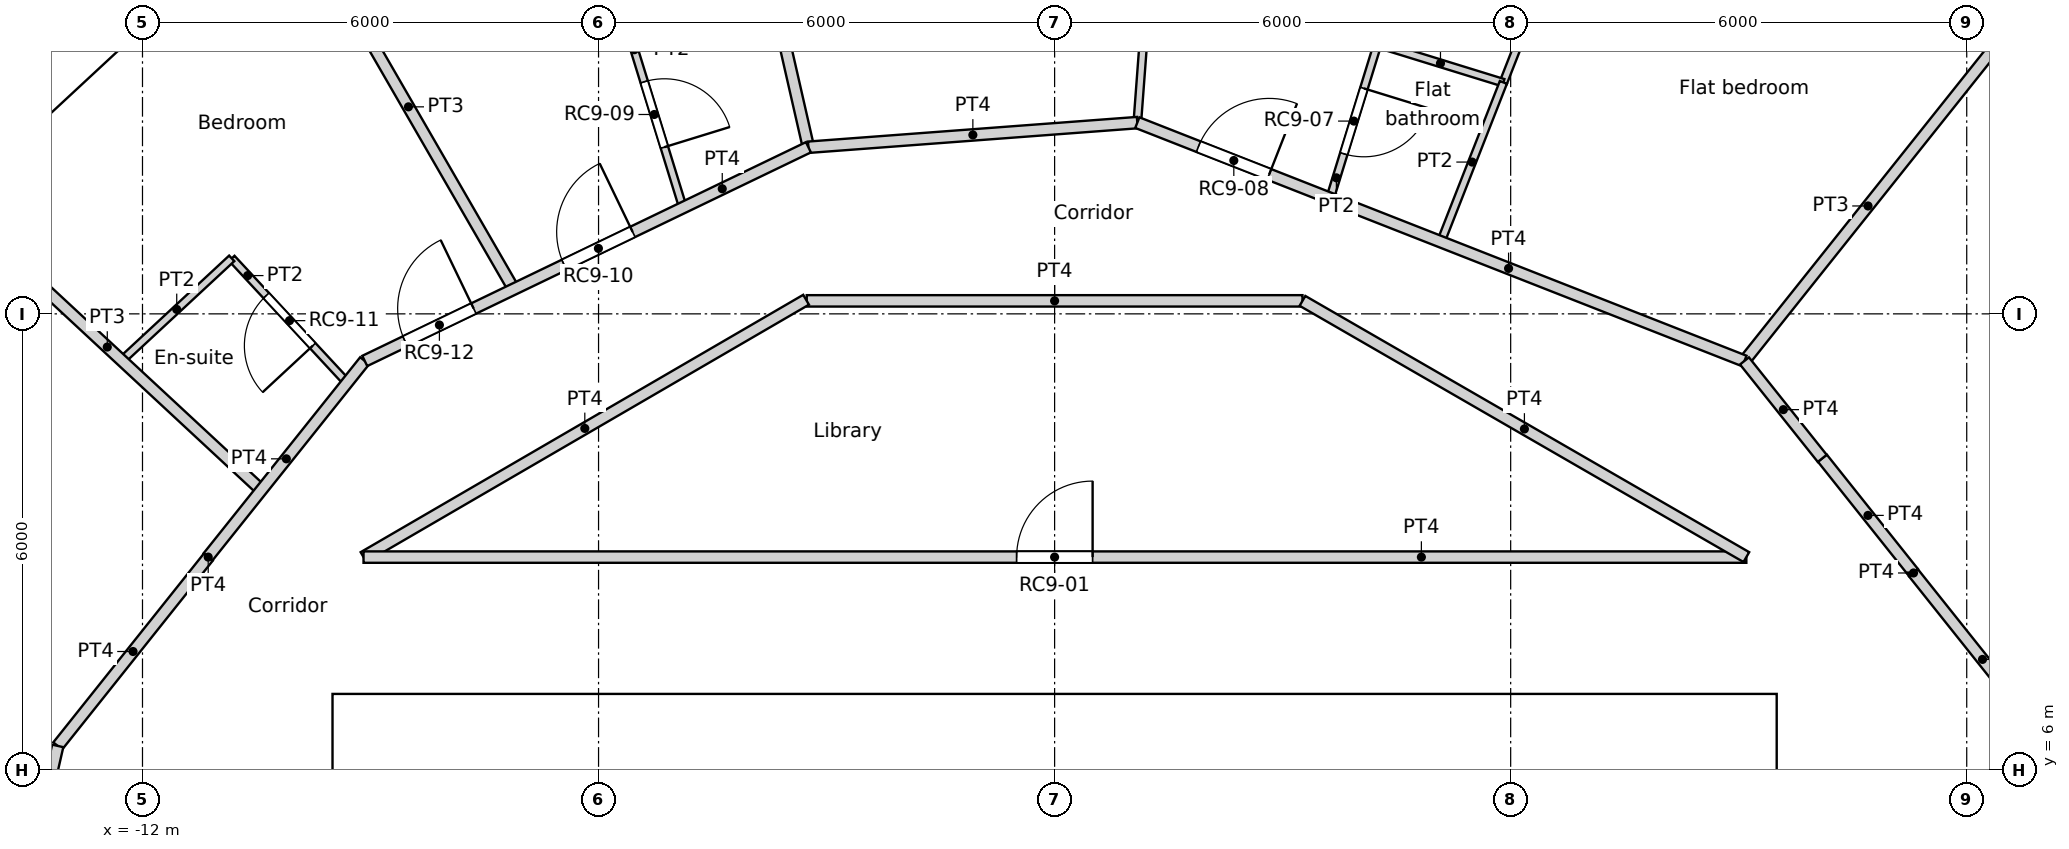
"""IFC4 building model, lengths in metres.
Left out: names, types, materials, properties, quantities, classifications, styles, units other than length and angle.
Written with IfcOpenShell. Run it as: python <this file> out.ifc"""

import sys

from ifc_helpers import new_model, si_unit, direction, frame, frame_2d, origin, origin_2d, place, context, subcontext, project, spatial, rectangle, circle, extrude, element, fill, save


model = new_model("IFC4")
c1 = context("Model", 3, precision=1e-05, world=origin(), true_north=direction((0.0, 1.0)))
c2 = subcontext(c1, "Body", "Model", "MODEL_VIEW")
j1 = project(units=[si_unit("LENGTHUNIT", "METRE"), si_unit("PLANEANGLEUNIT", "RADIAN")], contexts=[c1])
p1 = place(None, origin())
s1 = spatial("IfcSite", under=j1, at=p1, CompositionType="ELEMENT")
p2 = place(p1, origin())
s2 = spatial("IfcBuilding", under=s1, at=p2, CompositionType="ELEMENT")
p3 = place(p2, frame((0.0, 0.0, 316.2)))
s3 = spatial("IfcBuildingStorey", under=s2, at=p3, CompositionType="ELEMENT", Elevation=316.2)
p4 = place(p3, frame((11.735, 14.716, 0.0), z_axis=(0.0, 0.0, 1.0), x_axis=(1.0, 0.0, 0.0)))
e1 = element("IfcColumn", 1, at=p4, inside=s3, PredefinedType="COLUMN", context=c2, shape_type="SweptSolid", body=[
    extrude(circle(Radius=0.45, at=origin_2d()), origin(), (0.0, 0.0, 1.0), 3.6),
])
p5 = place(p3, frame((-12.804, 16.005, -0.35), z_axis=(0.0, 0.0, 1.0), x_axis=(-0.733022439167, -0.680204457261, 0.0)))
e2 = element("IfcWall", 2, at=p5, inside=s3, PredefinedType="ELEMENTEDWALL", context=c2, shape_type="SweptSolid", body=[
    extrude(rectangle(XDim=3.0, YDim=1.45, at=frame_2d((1.5, 0.0))), origin(), (0.0, 0.0, 1.0), 3.6),
])
p6 = place(p5, frame((1.5, 0.0, 1.9)))
e3 = element("IfcOpeningElement", 3, at=p6, cuts=e2, PredefinedType="OPENING", context=c2, shape_type="SweptSolid", body=[
    extrude(circle(Radius=0.9, at=origin_2d()), frame((0.0, 0.735, 0.0), z_axis=(0.0, -1.0, 0.0), x_axis=(1.0, 0.0, 0.0)), (0.0, 0.0, 1.0), 1.47),
])
p7 = place(p3, frame((-9.5, 6.7, 0.0), z_axis=(0.0, 0.0, 1.0), x_axis=(1.0, 0.0, 0.0)))
e4 = element("IfcWall", 4, at=p7, inside=s3, PredefinedType="SOLIDWALL", context=c2, shape_type="SweptSolid", body=[
    extrude(rectangle(XDim=19.0, YDim=0.6, at=frame_2d((9.5, 0.0))), origin(), (0.0, 0.0, 1.0), 3.6),
])
p8 = place(p7, frame((5.35, 0.0, 0.0)))
e5 = element("IfcOpeningElement", 5, at=p8, cuts=e4, PredefinedType="OPENING", context=c2, shape_type="SweptSolid", body=[
    extrude(rectangle(XDim=1.7, YDim=2.1, at=frame_2d((0.85, 1.05))), frame((0.0, 0.3, 0.0), z_axis=(0.0, -1.0, 0.0), x_axis=(1.0, 0.0, 0.0)), (0.0, 0.0, 1.0), 0.6),
])
p9 = place(p3, frame((-9.2, -6.4, 0.0), z_axis=(0.0, 0.0, 1.0), x_axis=(0.0, 1.0, 0.0)))
e6 = element("IfcWall", 6, at=p9, inside=s3, PredefinedType="SOLIDWALL", context=c2, shape_type="SweptSolid", body=[
    extrude(rectangle(XDim=12.8, YDim=0.6, at=frame_2d((6.4, 0.0))), origin(), (0.0, 0.0, 1.0), 3.6),
])
p10 = place(p3, frame((9.2, -6.4, 0.0), z_axis=(0.0, 0.0, 1.0), x_axis=(0.0, 1.0, 0.0)))
e7 = element("IfcWall", 7, at=p10, inside=s3, PredefinedType="SOLIDWALL", context=c2, shape_type="SweptSolid", body=[
    extrude(rectangle(XDim=12.8, YDim=0.6, at=frame_2d((6.4, 0.0))), origin(), (0.0, 0.0, 1.0), 3.6),
])
p11 = place(p10, frame((6.4, 0.0, 0.0)))
e8 = element("IfcOpeningElement", 8, at=p11, cuts=e7, PredefinedType="OPENING", context=c2, shape_type="SweptSolid", body=[
    extrude(rectangle(XDim=1.8, YDim=2.1, at=frame_2d((0.9, 1.05))), frame((0.0, 0.3, 0.0), z_axis=(0.0, -1.0, 0.0), x_axis=(1.0, 0.0, 0.0)), (0.0, 0.0, 1.0), 0.6),
])
for number, where, z_axis, x_axis in (
    (9, (-2.25, 3.25, 0.0), (0.0, 0.0, 1.0), (0.0, 1.0, 0.0)),
    (10, (0.55, 3.25, 0.0), (0.0, 0.0, 1.0), (0.0, 1.0, 0.0)),
    (11, (3.35, 3.25, 0.0), (0.0, 0.0, 1.0), (0.0, 1.0, 0.0)),
    (12, (6.15, 3.25, 0.0), (0.0, 0.0, 1.0), (0.0, 1.0, 0.0)),
):
    element("IfcWall", number, at=place(p3, frame(where, z_axis=z_axis, x_axis=x_axis)), inside=s3, PredefinedType="SOLIDWALL", context=c2, shape_type="SweptSolid", body=[
        extrude(rectangle(XDim=3.15, YDim=0.3, at=frame_2d((1.575, 0.0))), origin(), (0.0, 0.0, 1.0), 3.25),
    ])
p12 = place(p3, frame((-9.092, 8.8, 0.0), z_axis=(0.0, 0.0, 1.0), x_axis=(0.864470922103, 0.502682827277, 0.0)))
e13 = element("IfcWall", 13, at=p12, inside=s3, PredefinedType="PARTITIONING", context=c2, shape_type="SweptSolid", body=[
    extrude(rectangle(XDim=6.735, YDim=0.15, at=frame_2d((3.368, 0.0))), origin(), (0.0, 0.0, 1.0), 3.25),
])
p13 = place(p3, frame((-9.092, 8.8, 0.0), z_axis=(0.0, 0.0, 1.0), x_axis=(1.0, 0.0, 0.0)))
e14 = element("IfcWall", 14, at=p13, inside=s3, PredefinedType="PARTITIONING", context=c2, shape_type="SweptSolid", body=[
    extrude(rectangle(XDim=18.193, YDim=0.15, at=frame_2d((9.096, 0.0))), origin(), (0.0, 0.0, 1.0), 3.25),
])
p14 = place(p13, frame((8.592, 0.0, 0.0)))
e15 = element("IfcOpeningElement", 15, at=p14, cuts=e14, PredefinedType="OPENING", context=c2, shape_type="SweptSolid", body=[
    extrude(rectangle(XDim=1.0, YDim=2.04, at=frame_2d((0.5, 1.02))), frame((0.0, 0.075, 0.0), z_axis=(0.0, -1.0, 0.0), x_axis=(1.0, 0.0, 0.0)), (0.0, 0.0, 1.0), 0.15),
])
p15 = place(p3, frame((10.101, 10.101, 0.0), z_axis=(0.0, 0.0, 1.0), x_axis=(0.623130947784, -0.782117524362, 0.0)))
e16 = element("IfcWall", 16, at=p15, inside=s3, PredefinedType="PARTITIONING", context=c2, shape_type="SweptSolid", body=[
    extrude(rectangle(XDim=1.924, YDim=0.15, at=frame_2d((0.962, 0.0))), origin(), (0.0, 0.0, 1.0), 3.25),
])
p16 = place(p3, frame((11.3, 8.586, 0.0), z_axis=(0.0, 0.0, 1.0), x_axis=(0.0, 1.0, 0.0)))
e17 = element("IfcWall", 17, at=p16, inside=s3, PredefinedType="PARTITIONING", context=c2, shape_type="SweptSolid", body=[
    extrude(rectangle(XDim=0.01, YDim=0.15, at=frame_2d((0.005, 0.0))), origin(), (0.0, 0.0, 1.0), 3.25),
])
p17 = place(p3, frame((-11.137, 8.803, 0.0), z_axis=(0.0, 0.0, 1.0), x_axis=(0.624018330412, 0.781409702595, 0.0)))
e18 = element("IfcWall", 18, at=p17, inside=s3, PredefinedType="PARTITIONING", context=c2, shape_type="SweptSolid", body=[
    extrude(rectangle(XDim=3.301, YDim=0.15, at=frame_2d((1.65, 0.0))), origin(), (0.0, 0.0, 1.0), 3.25),
])
p18 = place(p3, frame((-11.134, 8.8, 0.0), z_axis=(0.0, 0.0, 1.0), x_axis=(-1.0, 0.0, 0.0)))
e19 = element("IfcWall", 19, at=p18, inside=s3, PredefinedType="PARTITIONING", context=c2, shape_type="SweptSolid", body=[
    extrude(rectangle(XDim=0.003, YDim=0.15, at=frame_2d((0.001, 0.0))), origin(), (0.0, 0.0, 1.0), 3.25),
])
p19 = place(p3, frame((11.3, 8.592, 0.0), z_axis=(0.0, 0.0, 1.0), x_axis=(0.623446514299, -0.781866001185, 0.0)))
e20 = element("IfcWall", 20, at=p19, inside=s3, PredefinedType="PARTITIONING", context=c2, shape_type="SweptSolid", body=[
    extrude(rectangle(XDim=2.911, YDim=0.15, at=frame_2d((1.456, 0.0))), origin(), (0.0, 0.0, 1.0), 3.25),
])
p20 = place(p3, frame((3.261, 12.171, 0.0), z_axis=(0.0, 0.0, 1.0), x_axis=(0.866066809554, -0.499928276245, 0.0)))
e21 = element("IfcWall", 21, at=p20, inside=s3, PredefinedType="PARTITIONING", context=c2, shape_type="SweptSolid", body=[
    extrude(rectangle(XDim=6.743, YDim=0.15, at=frame_2d((3.371, 0.0))), origin(), (0.0, 0.0, 1.0), 3.25),
])
p21 = place(p3, frame((-3.261, 12.171, 0.0), z_axis=(0.0, 0.0, 1.0), x_axis=(1.0, 0.0, 0.0)))
e22 = element("IfcWall", 22, at=p21, inside=s3, PredefinedType="PARTITIONING", context=c2, shape_type="SweptSolid", body=[
    extrude(rectangle(XDim=6.522, YDim=0.15, at=frame_2d((3.261, 0.0))), origin(), (0.0, 0.0, 1.0), 3.25),
])
p22 = place(p3, frame((9.076, 11.381, 0.0), z_axis=(0.0, 0.0, 1.0), x_axis=(0.623805208652, -0.781579849829, 0.0)))
e23 = element("IfcWall", 23, at=p22, inside=s3, PredefinedType="PARTITIONING", context=c2, shape_type="SweptSolid", body=[
    extrude(rectangle(XDim=1.64, YDim=0.15, at=frame_2d((0.82, 0.0))), origin(), (0.0, 0.0, 1.0), 3.25),
])
p23 = place(p3, frame((1.088, 14.516, 0.0), z_axis=(0.0, 0.0, 1.0), x_axis=(0.930800934608, -0.365526497168, 0.0)))
e24 = element("IfcWall", 24, at=p23, inside=s3, PredefinedType="PARTITIONING", context=c2, shape_type="SweptSolid", body=[
    extrude(rectangle(XDim=8.581, YDim=0.15, at=frame_2d((4.291, 0.0))), origin(), (0.0, 0.0, 1.0), 3.25),
])
p24 = place(p23, frame((0.864, 0.0, 0.0)))
e25 = element("IfcOpeningElement", 25, at=p24, cuts=e24, PredefinedType="OPENING", context=c2, shape_type="SweptSolid", body=[
    extrude(rectangle(XDim=1.0, YDim=2.1, at=frame_2d((0.5, 1.05))), frame((0.0, 0.075, 0.0), z_axis=(0.0, -1.0, 0.0), x_axis=(1.0, 0.0, 0.0)), (0.0, 0.0, 1.0), 0.15),
])
p25 = place(p3, frame((-3.239, 14.192, 0.0), z_axis=(0.0, 0.0, 1.0), x_axis=(0.997204448067, 0.074721407608, 0.0)))
e26 = element("IfcWall", 26, at=p25, inside=s3, PredefinedType="PARTITIONING", context=c2, shape_type="SweptSolid", body=[
    extrude(rectangle(XDim=4.339, YDim=0.15, at=frame_2d((2.169, 0.0))), origin(), (0.0, 0.0, 1.0), 3.25),
])
p26 = place(p3, frame((-9.076, 11.381, 0.0), z_axis=(0.0, 0.0, 1.0), x_axis=(0.900939467372, 0.433944784657, 0.0)))
e27 = element("IfcWall", 27, at=p26, inside=s3, PredefinedType="PARTITIONING", context=c2, shape_type="SweptSolid", body=[
    extrude(rectangle(XDim=6.479, YDim=0.15, at=frame_2d((3.239, 0.0))), origin(), (0.0, 0.0, 1.0), 3.25),
])
p27 = place(p26, frame((2.912, 0.0, 0.0)))
e28 = element("IfcOpeningElement", 28, at=p27, cuts=e27, PredefinedType="OPENING", context=c2, shape_type="SweptSolid", body=[
    extrude(rectangle(XDim=1.0, YDim=2.1, at=frame_2d((0.5, 1.05))), frame((0.0, 0.075, 0.0), z_axis=(0.0, -1.0, 0.0), x_axis=(1.0, 0.0, 0.0)), (0.0, 0.0, 1.0), 0.15),
])
p28 = place(p26, frame((0.59, 0.0, 0.0)))
e29 = element("IfcOpeningElement", 29, at=p28, cuts=e27, PredefinedType="OPENING", context=c2, shape_type="SweptSolid", body=[
    extrude(rectangle(XDim=1.0, YDim=2.1, at=frame_2d((0.5, 1.05))), frame((0.0, 0.075, 0.0), z_axis=(0.0, -1.0, 0.0), x_axis=(1.0, 0.0, 0.0)), (0.0, 0.0, 1.0), 0.15),
])
p29 = place(p3, frame((-14.557, 0.0, 0.0), z_axis=(0.0, 0.0, 1.0), x_axis=(0.222568978642, 0.97491694505, 0.0)))
e30 = element("IfcWall", 30, at=p29, inside=s3, PredefinedType="PARTITIONING", context=c2, shape_type="SweptSolid", body=[
    extrude(rectangle(XDim=6.479, YDim=0.15, at=frame_2d((3.239, 0.0))), origin(), (0.0, 0.0, 1.0), 3.25),
])
p30 = place(p29, frame((2.739, 0.0, 0.0)))
e31 = element("IfcOpeningElement", 31, at=p30, cuts=e30, PredefinedType="OPENING", context=c2, shape_type="SweptSolid", body=[
    extrude(rectangle(XDim=1.0, YDim=2.04, at=frame_2d((0.5, 1.02))), frame((0.0, 0.075, 0.0), z_axis=(0.0, -1.0, 0.0), x_axis=(1.0, 0.0, 0.0)), (0.0, 0.0, 1.0), 0.15),
])
p31 = place(p3, frame((-13.115, 6.316, 0.0), z_axis=(0.0, 0.0, 1.0), x_axis=(0.623476099415, 0.781842409606, 0.0)))
e32 = element("IfcWall", 32, at=p31, inside=s3, PredefinedType="PARTITIONING", context=c2, shape_type="SweptSolid", body=[
    extrude(rectangle(XDim=3.177, YDim=0.15, at=frame_2d((1.589, 0.0))), origin(), (0.0, 0.0, 1.0), 3.25),
])
p32 = place(p3, frame((9.076, 11.381, 0.0), z_axis=(0.0, 0.0, 1.0), x_axis=(0.623460949534, 0.781854490558, 0.0)))
e33 = element("IfcWall", 33, at=p32, inside=s3, PredefinedType="PARTITIONING", context=c2, shape_type="SweptSolid", body=[
    extrude(rectangle(XDim=5.214, YDim=0.15, at=frame_2d((2.607, 0.0))), origin(), (0.0, 0.0, 1.0), 3.25),
])
p33 = place(p3, frame((5.903, 15.041, 0.0), z_axis=(0.0, 0.0, 1.0), x_axis=(0.36523219083, 0.930916455318, 0.0)))
e34 = element("IfcWall", 34, at=p33, inside=s3, PredefinedType="PARTITIONING", context=c2, shape_type="SweptSolid", body=[
    extrude(rectangle(XDim=3.614, YDim=0.1, at=frame_2d((1.807, 0.0))), origin(), (0.0, 0.0, 1.0), 3.25),
])
p34 = place(p33, frame((0.757, 0.0, 0.0)))
e35 = element("IfcOpeningElement", 35, at=p34, cuts=e34, PredefinedType="OPENING", context=c2, shape_type="SweptSolid", body=[
    extrude(rectangle(XDim=0.9, YDim=2.1, at=frame_2d((0.45, 1.05))), frame((0.0, 0.05, 0.0), z_axis=(0.0, -1.0, 0.0), x_axis=(1.0, 0.0, 0.0)), (0.0, 0.0, 1.0), 0.1),
])
p35 = place(p3, frame((1.088, 14.516, 0.0), z_axis=(0.0, 0.0, 1.0), x_axis=(0.074816718541, 0.997197301755, 0.0)))
e36 = element("IfcWall", 36, at=p35, inside=s3, PredefinedType="PARTITIONING", context=c2, shape_type="SweptSolid", body=[
    extrude(rectangle(XDim=5.215, YDim=0.1, at=frame_2d((2.607, 0.0))), origin(), (0.0, 0.0, 1.0), 3.25),
])
p36 = place(p35, frame((2.157, 0.0, 0.0)))
e37 = element("IfcOpeningElement", 37, at=p36, cuts=e36, PredefinedType="OPENING", context=c2, shape_type="SweptSolid", body=[
    extrude(rectangle(XDim=0.9, YDim=2.1, at=frame_2d((0.45, 1.05))), frame((0.0, 0.05, 0.0), z_axis=(0.0, -1.0, 0.0), x_axis=(1.0, 0.0, 0.0)), (0.0, 0.0, 1.0), 0.1),
])
p37 = place(p3, frame((4.25, 15.551, 0.0), z_axis=(0.0, 0.0, 1.0), x_axis=(0.955555986234, -0.294809696536, 0.0)))
e38 = element("IfcWall", 38, at=p37, inside=s3, PredefinedType="PARTITIONING", context=c2, shape_type="SweptSolid", body=[
    extrude(rectangle(XDim=1.73, YDim=0.1, at=frame_2d((0.865, 0.0))), origin(), (0.0, 0.0, 1.0), 3.25),
])
p38 = place(p3, frame((3.624, 13.521, 0.0), z_axis=(0.0, 0.0, 1.0), x_axis=(0.294667251911, 0.955599921856, 0.0)))
e39 = element("IfcWall", 39, at=p38, inside=s3, PredefinedType="PARTITIONING", context=c2, shape_type="SweptSolid", body=[
    extrude(rectangle(XDim=2.124, YDim=0.1, at=frame_2d((1.062, 0.0))), origin(), (0.0, 0.0, 1.0), 3.25),
])
p39 = place(p38, frame((0.612, 0.0, 0.0)))
e40 = element("IfcOpeningElement", 40, at=p39, cuts=e39, PredefinedType="OPENING", context=c2, shape_type="SweptSolid", body=[
    extrude(rectangle(XDim=0.9, YDim=2.0, at=frame_2d((0.45, 1.0))), frame((0.0, 0.05, 0.0), z_axis=(0.0, -1.0, 0.0), x_axis=(1.0, 0.0, 0.0)), (0.0, 0.0, 1.0), 0.1),
])
p40 = place(p3, frame((5.082, 12.949, 0.0), z_axis=(0.0, 0.0, 1.0), x_axis=(0.365118857447, 0.930960912142, 0.0)))
e41 = element("IfcWall", 41, at=p40, inside=s3, PredefinedType="PARTITIONING", context=c2, shape_type="SweptSolid", body=[
    extrude(rectangle(XDim=2.251, YDim=0.1, at=frame_2d((1.126, 0.0))), origin(), (0.0, 0.0, 1.0), 3.25),
])
p41 = place(p3, frame((-4.4, 19.276, 0.0), z_axis=(0.0, 0.0, 1.0), x_axis=(0.222612505682, -0.974907007008, 0.0)))
e42 = element("IfcWall", 42, at=p41, inside=s3, PredefinedType="PARTITIONING", context=c2, shape_type="SweptSolid", body=[
    extrude(rectangle(XDim=5.215, YDim=0.15, at=frame_2d((2.607, 0.0))), origin(), (0.0, 0.0, 1.0), 3.25),
])
p42 = place(p3, frame((-5.645, 15.849, 0.0), z_axis=(0.0, 0.0, 1.0), x_axis=(0.294654076104, -0.955603984627, 0.0)))
e43 = element("IfcWall", 43, at=p42, inside=s3, PredefinedType="PARTITIONING", context=c2, shape_type="SweptSolid", body=[
    extrude(rectangle(XDim=2.566, YDim=0.1, at=frame_2d((1.283, 0.0))), origin(), (0.0, 0.0, 1.0), 3.25),
])
p43 = place(p42, frame((0.833, 0.0, 0.0)))
e44 = element("IfcOpeningElement", 44, at=p43, cuts=e43, PredefinedType="OPENING", context=c2, shape_type="SweptSolid", body=[
    extrude(rectangle(XDim=0.9, YDim=2.04, at=frame_2d((0.45, 1.02))), frame((0.0, 0.05, 0.0), z_axis=(0.0, -1.0, 0.0), x_axis=(1.0, 0.0, 0.0)), (0.0, 0.0, 1.0), 0.1),
])
p44 = place(p3, frame((-9.886, 17.122, 0.0), z_axis=(0.0, 0.0, 1.0), x_axis=(0.500054359786, -0.865994016873, 0.0)))
e45 = element("IfcWall", 45, at=p44, inside=s3, PredefinedType="PARTITIONING", context=c2, shape_type="SweptSolid", body=[
    extrude(rectangle(XDim=5.54, YDim=0.15, at=frame_2d((2.77, 0.0))), origin(), (0.0, 0.0, 1.0), 3.25),
])
p45 = place(p3, frame((-10.826, 12.73, 0.0), z_axis=(0.0, 0.0, 1.0), x_axis=(0.680228963773, -0.732999697711, 0.0)))
e46 = element("IfcWall", 46, at=p45, inside=s3, PredefinedType="PARTITIONING", context=c2, shape_type="SweptSolid", body=[
    extrude(rectangle(XDim=2.235, YDim=0.1, at=frame_2d((1.117, 0.0))), origin(), (0.0, 0.0, 1.0), 3.25),
])
p46 = place(p45, frame((0.667, 0.0, 0.0)))
e47 = element("IfcOpeningElement", 47, at=p46, cuts=e46, PredefinedType="OPENING", context=c2, shape_type="SweptSolid", body=[
    extrude(rectangle(XDim=0.9, YDim=2.04, at=frame_2d((0.45, 1.02))), frame((0.0, 0.05, 0.0), z_axis=(0.0, -1.0, 0.0), x_axis=(1.0, 0.0, 0.0)), (0.0, 0.0, 1.0), 0.1),
])
p47 = place(p3, frame((-12.273, 11.387, 0.0), z_axis=(0.0, 0.0, 1.0), x_axis=(0.732956436026, 0.680275578636, 0.0)))
e48 = element("IfcWall", 48, at=p47, inside=s3, PredefinedType="PARTITIONING", context=c2, shape_type="SweptSolid", body=[
    extrude(rectangle(XDim=1.974, YDim=0.1, at=frame_2d((0.987, 0.0))), origin(), (0.0, 0.0, 1.0), 3.25),
])
p48 = place(p3, frame((-14.493, 13.448, 0.0), z_axis=(0.0, 0.0, 1.0), x_axis=(0.732845293448, -0.680395308531, 0.0)))
e49 = element("IfcWall", 49, at=p48, inside=s3, PredefinedType="PARTITIONING", context=c2, shape_type="SweptSolid", body=[
    extrude(rectangle(XDim=5.539, YDim=0.15, at=frame_2d((2.77, 0.0))), origin(), (0.0, 0.0, 1.0), 3.25),
])
p49 = place(p6, origin())
e50 = element("IfcWindow", 50, at=p49, inside=s3, PartitioningType="SINGLE_PANEL", PredefinedType="WINDOW", context=c2, shape_type="SweptSolid", body=[
    extrude(circle(Radius=0.9, at=origin_2d()), frame((0.0, 0.695, 0.0), z_axis=(0.0, -1.0, 0.0), x_axis=(1.0, 0.0, 0.0)), (0.0, 0.0, 1.0), 0.1),
])
fill(e3, e50)
p50 = place(p8, origin())
e51 = element("IfcDoor", 51, at=p50, inside=s3, OperationType="DOUBLE_DOOR_SINGLE_SWING", PredefinedType="DOOR", context=c2, shape_type="SweptSolid", body=[
    extrude(rectangle(XDim=1.7, YDim=2.1, at=frame_2d((0.85, 1.05))), frame((0.0, 0.025, 0.0), z_axis=(0.0, -1.0, 0.0), x_axis=(1.0, 0.0, 0.0)), (0.0, 0.0, 1.0), 0.05),
])
fill(e5, e51)
p51 = place(p14, origin())
e52 = element("IfcDoor", 52, at=p51, inside=s3, OperationType="SINGLE_SWING_RIGHT", PredefinedType="DOOR", context=c2, shape_type="SweptSolid", body=[
    extrude(rectangle(XDim=1.0, YDim=2.04, at=frame_2d((0.5, 1.02))), frame((0.0, 0.025, 0.0), z_axis=(0.0, -1.0, 0.0), x_axis=(1.0, 0.0, 0.0)), (0.0, 0.0, 1.0), 0.05),
])
fill(e15, e52)
p52 = place(p39, origin())
e53 = element("IfcDoor", 53, at=p52, inside=s3, OperationType="SINGLE_SWING_LEFT", PredefinedType="DOOR", context=c2, shape_type="SweptSolid", body=[
    extrude(rectangle(XDim=0.9, YDim=2.0, at=frame_2d((0.45, 1.0))), frame((0.0, 0.025, 0.0), z_axis=(0.0, -1.0, 0.0), x_axis=(1.0, 0.0, 0.0)), (0.0, 0.0, 1.0), 0.05),
])
fill(e40, e53)
p53 = place(p24, origin())
e54 = element("IfcDoor", 54, at=p53, inside=s3, OperationType="SINGLE_SWING_RIGHT", PredefinedType="DOOR", context=c2, shape_type="SweptSolid", body=[
    extrude(rectangle(XDim=1.0, YDim=2.1, at=frame_2d((0.5, 1.05))), frame((0.0, 0.025, 0.0), z_axis=(0.0, -1.0, 0.0), x_axis=(1.0, 0.0, 0.0)), (0.0, 0.0, 1.0), 0.05),
])
fill(e25, e54)
p54 = place(p43, origin())
e55 = element("IfcDoor", 55, at=p54, inside=s3, OperationType="SINGLE_SWING_RIGHT", PredefinedType="DOOR", context=c2, shape_type="SweptSolid", body=[
    extrude(rectangle(XDim=0.9, YDim=2.04, at=frame_2d((0.45, 1.02))), frame((0.0, 0.025, 0.0), z_axis=(0.0, -1.0, 0.0), x_axis=(1.0, 0.0, 0.0)), (0.0, 0.0, 1.0), 0.05),
])
fill(e44, e55)
p55 = place(p27, origin())
e56 = element("IfcDoor", 56, at=p55, inside=s3, OperationType="SINGLE_SWING_RIGHT", PredefinedType="DOOR", context=c2, shape_type="SweptSolid", body=[
    extrude(rectangle(XDim=1.0, YDim=2.1, at=frame_2d((0.5, 1.05))), frame((0.0, 0.025, 0.0), z_axis=(0.0, -1.0, 0.0), x_axis=(1.0, 0.0, 0.0)), (0.0, 0.0, 1.0), 0.05),
])
fill(e28, e56)
p56 = place(p46, origin())
e57 = element("IfcDoor", 57, at=p56, inside=s3, OperationType="SINGLE_SWING_LEFT", PredefinedType="DOOR", context=c2, shape_type="SweptSolid", body=[
    extrude(rectangle(XDim=0.9, YDim=2.04, at=frame_2d((0.45, 1.02))), frame((0.0, 0.025, 0.0), z_axis=(0.0, -1.0, 0.0), x_axis=(1.0, 0.0, 0.0)), (0.0, 0.0, 1.0), 0.05),
])
fill(e47, e57)
p57 = place(p28, origin())
e58 = element("IfcDoor", 58, at=p57, inside=s3, OperationType="SINGLE_SWING_RIGHT", PredefinedType="DOOR", context=c2, shape_type="SweptSolid", body=[
    extrude(rectangle(XDim=1.0, YDim=2.1, at=frame_2d((0.5, 1.05))), frame((0.0, 0.025, 0.0), z_axis=(0.0, -1.0, 0.0), x_axis=(1.0, 0.0, 0.0)), (0.0, 0.0, 1.0), 0.05),
])
fill(e29, e58)
save(model, sys.argv[1])
